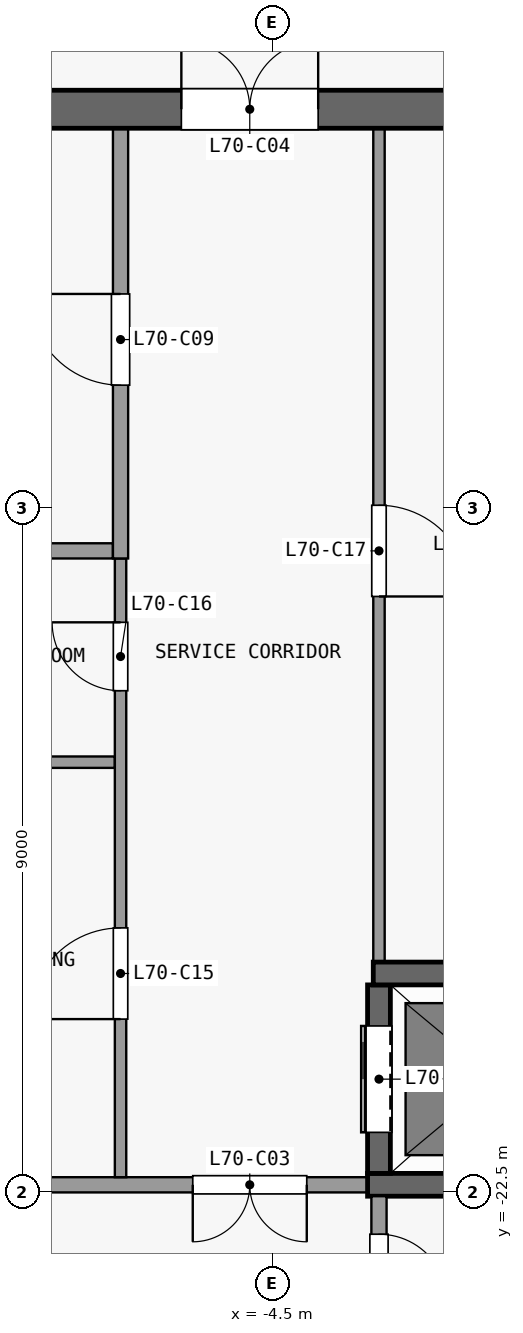
"""IFC4 building model, lengths in metres.
Left out: names, types, materials, properties, quantities, classifications, styles, units other than length and angle.
Written with IfcOpenShell. Run it as: python <this file> out.ifc"""

import sys

from ifc_helpers import new_model, si_unit, direction, frame, frame_2d, origin, place, context, subcontext, project, spatial, rectangle, extrude, element, fill, save


model = new_model("IFC4")
c1 = context("Model", 3, precision=1e-05, world=origin(), true_north=direction((0.0, 1.0)))
c2 = subcontext(c1, "Body", "Model", "MODEL_VIEW")
j1 = project(units=[si_unit("LENGTHUNIT", "METRE"), si_unit("PLANEANGLEUNIT", "RADIAN")], contexts=[c1])
p1 = place(None, origin())
s1 = spatial("IfcSite", under=j1, at=p1, CompositionType="ELEMENT")
p2 = place(p1, origin())
s2 = spatial("IfcBuilding", under=s1, at=p2, CompositionType="ELEMENT")
p3 = place(p2, frame((0.0, 0.0, 277.1)))
s3 = spatial("IfcBuildingStorey", under=s2, at=p3, CompositionType="ELEMENT", Elevation=277.1)
p4 = place(p3, frame((-13.1, -8.25, 0.0), z_axis=(0.0, 0.0, 1.0), x_axis=(1.0, 0.0, 0.0)))
e1 = element("IfcWall", 1, at=p4, inside=s3, PredefinedType="SHEAR", context=c2, shape_type="SweptSolid", body=[
    extrude(rectangle(XDim=26.2, YDim=0.5, at=frame_2d((13.1, 0.0))), origin(), (0.0, 0.0, 1.0), 3.3),
])
p5 = place(p4, frame((7.4, 0.0, 0.0)))
e2 = element("IfcOpeningElement", 2, at=p5, cuts=e1, PredefinedType="OPENING", context=c2, shape_type="SweptSolid", body=[
    extrude(rectangle(XDim=1.8, YDim=2.1, at=frame_2d((0.9, 1.05))), frame((0.0, 0.26, 0.0), z_axis=(0.0, -1.0, 0.0), x_axis=(1.0, 0.0, 0.0)), (0.0, 0.0, 1.0), 0.52),
])
p6 = place(p4, frame((17.0, 0.0, 0.0)))
e3 = element("IfcOpeningElement", 3, at=p6, cuts=e1, PredefinedType="OPENING", context=c2, shape_type="SweptSolid", body=[
    extrude(rectangle(XDim=1.8, YDim=2.1, at=frame_2d((0.9, 1.05))), frame((0.0, 0.26, 0.0), z_axis=(0.0, -1.0, 0.0), x_axis=(1.0, 0.0, 0.0)), (0.0, 0.0, 1.0), 0.52),
])
p7 = place(p4, frame((2.325, 0.0, 0.0)))
e4 = element("IfcOpeningElement", 4, at=p7, cuts=e1, PredefinedType="OPENING", context=c2, shape_type="SweptSolid", body=[
    extrude(rectangle(XDim=0.9, YDim=2.1, at=frame_2d((0.45, 1.05))), frame((0.0, 0.26, 0.0), z_axis=(0.0, -1.0, 0.0), x_axis=(1.0, 0.0, 0.0)), (0.0, 0.0, 1.0), 0.52),
])
p8 = place(p4, frame((22.975, 0.0, 0.0)))
e5 = element("IfcOpeningElement", 5, at=p8, cuts=e1, PredefinedType="OPENING", context=c2, shape_type="SweptSolid", body=[
    extrude(rectangle(XDim=0.9, YDim=2.1, at=frame_2d((0.45, 1.05))), frame((0.0, 0.26, 0.0), z_axis=(0.0, -1.0, 0.0), x_axis=(1.0, 0.0, 0.0)), (0.0, 0.0, 1.0), 0.52),
])
p9 = place(p3, frame((-3.25, -22.4, 0.0), z_axis=(0.0, 0.0, 1.0), x_axis=(-1.0, 0.0, 0.0)))
e6 = element("IfcWall", 6, at=p9, inside=s3, PredefinedType="PARTITIONING", context=c2, shape_type="SweptSolid", body=[
    extrude(rectangle(XDim=6.2, YDim=0.2, at=frame_2d((3.1, 0.0))), origin(), (0.0, 0.0, 1.0), 3.3),
])
p10 = place(p9, frame((0.8, 0.0, 0.0)))
e7 = element("IfcOpeningElement", 7, at=p10, cuts=e6, PredefinedType="OPENING", context=c2, shape_type="SweptSolid", body=[
    extrude(rectangle(XDim=1.5, YDim=2.1, at=frame_2d((0.75, 1.05))), frame((0.0, 0.11, 0.0), z_axis=(0.0, -1.0, 0.0), x_axis=(1.0, 0.0, 0.0)), (0.0, 0.0, 1.0), 0.22),
])
p11 = place(p3, frame((-3.25, -22.4, 0.0), z_axis=(0.0, 0.0, 1.0), x_axis=(1.0, 0.0, 0.0)))
e8 = element("IfcWall", 8, at=p11, inside=s3, PredefinedType="SHEAR", context=c2, shape_type="SweptSolid", body=[
    extrude(rectangle(XDim=6.5, YDim=0.3, at=frame_2d((3.25, 0.0))), origin(), (0.0, 0.0, 1.0), 3.3),
])
p12 = place(p3, frame((-3.175, -19.62, 0.0), z_axis=(0.0, 0.0, 1.0), x_axis=(1.0, 0.0, 0.0)))
e9 = element("IfcWall", 9, at=p12, inside=s3, PredefinedType="SHEAR", context=c2, shape_type="SweptSolid", body=[
    extrude(rectangle(XDim=3.025, YDim=0.3, at=frame_2d((1.513, 0.0))), origin(), (0.0, 0.0, 1.0), 3.3),
])
p13 = place(p3, frame((-9.5, -16.84, 0.0), z_axis=(0.0, 0.0, 1.0), x_axis=(1.0, 0.0, 0.0)))
e10 = element("IfcWall", 10, at=p13, inside=s3, PredefinedType="PARTITIONING", context=c2, shape_type="SweptSolid", body=[
    extrude(rectangle(XDim=2.925, YDim=0.15, at=frame_2d((1.462, 0.0))), origin(), (0.0, 0.0, 1.0), 3.3),
])
p14 = place(p3, frame((-9.5, -14.06, 0.0), z_axis=(0.0, 0.0, 1.0), x_axis=(1.0, 0.0, 0.0)))
e11 = element("IfcWall", 11, at=p14, inside=s3, PredefinedType="PARTITIONING", context=c2, shape_type="SweptSolid", body=[
    extrude(rectangle(XDim=2.9, YDim=0.2, at=frame_2d((1.45, 0.0))), origin(), (0.0, 0.0, 1.0), 3.3),
])
p15 = place(p3, frame((-6.5, -22.3, 0.0), z_axis=(0.0, 0.0, 1.0), x_axis=(0.0, 1.0, 0.0)))
e12 = element("IfcWall", 12, at=p15, inside=s3, PredefinedType="PARTITIONING", context=c2, shape_type="SweptSolid", body=[
    extrude(rectangle(XDim=8.14, YDim=0.15, at=frame_2d((4.07, 0.0))), origin(), (0.0, 0.0, 1.0), 3.3),
])
p16 = place(p15, frame((2.08, 0.0, 0.0)))
e13 = element("IfcOpeningElement", 13, at=p16, cuts=e12, PredefinedType="OPENING", context=c2, shape_type="SweptSolid", body=[
    extrude(rectangle(XDim=1.2, YDim=2.1, at=frame_2d((0.6, 1.05))), frame((0.0, 0.085, 0.0), z_axis=(0.0, -1.0, 0.0), x_axis=(1.0, 0.0, 0.0)), (0.0, 0.0, 1.0), 0.17),
])
p17 = place(p15, frame((6.4, 0.0, 0.0)))
e14 = element("IfcOpeningElement", 14, at=p17, cuts=e12, PredefinedType="OPENING", context=c2, shape_type="SweptSolid", body=[
    extrude(rectangle(XDim=0.9, YDim=2.1, at=frame_2d((0.45, 1.05))), frame((0.0, 0.085, 0.0), z_axis=(0.0, -1.0, 0.0), x_axis=(1.0, 0.0, 0.0)), (0.0, 0.0, 1.0), 0.17),
])
p18 = place(p3, frame((-6.5, -14.16, 0.0), z_axis=(0.0, 0.0, 1.0), x_axis=(0.0, 1.0, 0.0)))
e15 = element("IfcWall", 15, at=p18, inside=s3, PredefinedType="PARTITIONING", context=c2, shape_type="SweptSolid", body=[
    extrude(rectangle(XDim=5.66, YDim=0.2, at=frame_2d((2.83, 0.0))), origin(), (0.0, 0.0, 1.0), 3.3),
])
p19 = place(p18, frame((2.28, 0.0, 0.0)))
e16 = element("IfcOpeningElement", 16, at=p19, cuts=e15, PredefinedType="OPENING", context=c2, shape_type="SweptSolid", body=[
    extrude(rectangle(XDim=1.2, YDim=2.1, at=frame_2d((0.6, 1.05))), frame((0.0, 0.11, 0.0), z_axis=(0.0, -1.0, 0.0), x_axis=(1.0, 0.0, 0.0)), (0.0, 0.0, 1.0), 0.22),
])
p20 = place(p3, frame((-3.1, -22.55, 0.0), z_axis=(0.0, 0.0, 1.0), x_axis=(0.0, -1.0, 0.0)))
e17 = element("IfcWall", 17, at=p20, inside=s3, PredefinedType="PARTITIONING", context=c2, shape_type="SweptSolid", body=[
    extrude(rectangle(XDim=2.05, YDim=0.2, at=frame_2d((1.025, 0.0))), origin(), (0.0, 0.0, 1.0), 3.3),
])
p21 = place(p20, frame((0.5, 0.0, 0.0)))
e18 = element("IfcOpeningElement", 18, at=p21, cuts=e17, PredefinedType="OPENING", context=c2, shape_type="SweptSolid", body=[
    extrude(rectangle(XDim=0.9, YDim=2.1, at=frame_2d((0.45, 1.05))), frame((0.0, 0.11, 0.0), z_axis=(0.0, -1.0, 0.0), x_axis=(1.0, 0.0, 0.0)), (0.0, 0.0, 1.0), 0.22),
])
p22 = place(p3, frame((-3.1, -22.25, 0.0), z_axis=(0.0, 0.0, 1.0), x_axis=(0.0, 1.0, 0.0)))
e19 = element("IfcWall", 19, at=p22, inside=s3, PredefinedType="SHEAR", context=c2, shape_type="SweptSolid", body=[
    extrude(rectangle(XDim=2.48, YDim=0.3, at=frame_2d((1.24, 0.0))), origin(), (0.0, 0.0, 1.0), 3.3),
])
p23 = place(p22, frame((0.54, 0.0, 0.0)))
e20 = element("IfcOpeningElement", 20, at=p23, cuts=e19, PredefinedType="OPENING", context=c2, shape_type="SweptSolid", body=[
    extrude(rectangle(XDim=1.4, YDim=2.1, at=frame_2d((0.7, 1.05))), frame((0.0, 0.16, 0.0), z_axis=(0.0, -1.0, 0.0), x_axis=(1.0, 0.0, 0.0)), (0.0, 0.0, 1.0), 0.32),
])
p24 = place(p3, frame((-3.1, -8.5, 0.0), z_axis=(0.0, 0.0, 1.0), x_axis=(0.0, -1.0, 0.0)))
e21 = element("IfcWall", 21, at=p24, inside=s3, PredefinedType="PARTITIONING", context=c2, shape_type="SweptSolid", body=[
    extrude(rectangle(XDim=10.97, YDim=0.15, at=frame_2d((5.485, 0.0))), origin(), (0.0, 0.0, 1.0), 3.3),
])
p25 = place(p24, frame((4.96, 0.0, 0.0)))
e22 = element("IfcOpeningElement", 22, at=p25, cuts=e21, PredefinedType="OPENING", context=c2, shape_type="SweptSolid", body=[
    extrude(rectangle(XDim=1.2, YDim=2.1, at=frame_2d((0.6, 1.05))), frame((0.0, 0.085, 0.0), z_axis=(0.0, -1.0, 0.0), x_axis=(1.0, 0.0, 0.0)), (0.0, 0.0, 1.0), 0.17),
])
p26 = place(p23, origin())
e23 = element("IfcDoor", 23, at=p26, inside=s3, OperationType="DOUBLE_DOOR_SLIDING", PredefinedType="DOOR", context=c2, shape_type="SweptSolid", body=[
    extrude(rectangle(XDim=1.4, YDim=2.1, at=frame_2d((0.7, 1.05))), frame((0.0, 0.025, 0.0), z_axis=(0.0, -1.0, 0.0), x_axis=(1.0, 0.0, 0.0)), (0.0, 0.0, 1.0), 0.05),
])
fill(e20, e23)
p27 = place(p10, origin())
e24 = element("IfcDoor", 24, at=p27, inside=s3, OperationType="DOUBLE_DOOR_SINGLE_SWING", PredefinedType="DOOR", context=c2, shape_type="SweptSolid", body=[
    extrude(rectangle(XDim=1.5, YDim=2.1, at=frame_2d((0.75, 1.05))), frame((0.0, 0.025, 0.0), z_axis=(0.0, -1.0, 0.0), x_axis=(1.0, 0.0, 0.0)), (0.0, 0.0, 1.0), 0.05),
])
fill(e7, e24)
p28 = place(p5, origin())
e25 = element("IfcDoor", 25, at=p28, inside=s3, OperationType="DOUBLE_DOOR_SINGLE_SWING", PredefinedType="DOOR", context=c2, shape_type="SweptSolid", body=[
    extrude(rectangle(XDim=1.8, YDim=2.1, at=frame_2d((0.9, 1.05))), frame((0.0, 0.025, 0.0), z_axis=(0.0, -1.0, 0.0), x_axis=(1.0, 0.0, 0.0)), (0.0, 0.0, 1.0), 0.05),
])
fill(e2, e25)
p29 = place(p19, origin())
e26 = element("IfcDoor", 26, at=p29, inside=s3, OperationType="SINGLE_SWING_RIGHT", PredefinedType="DOOR", context=c2, shape_type="SweptSolid", body=[
    extrude(rectangle(XDim=1.2, YDim=2.1, at=frame_2d((0.6, 1.05))), frame((0.0, 0.025, 0.0), z_axis=(0.0, -1.0, 0.0), x_axis=(1.0, 0.0, 0.0)), (0.0, 0.0, 1.0), 0.05),
])
fill(e16, e26)
p30 = place(p21, origin())
e27 = element("IfcDoor", 27, at=p30, inside=s3, OperationType="SINGLE_SWING_RIGHT", PredefinedType="DOOR", context=c2, shape_type="SweptSolid", body=[
    extrude(rectangle(XDim=0.9, YDim=2.1, at=frame_2d((0.45, 1.05))), frame((0.0, 0.025, 0.0), z_axis=(0.0, -1.0, 0.0), x_axis=(1.0, 0.0, 0.0)), (0.0, 0.0, 1.0), 0.05),
])
fill(e18, e27)
p31 = place(p16, origin())
e28 = element("IfcDoor", 28, at=p31, inside=s3, OperationType="SINGLE_SWING_LEFT", PredefinedType="DOOR", context=c2, shape_type="SweptSolid", body=[
    extrude(rectangle(XDim=1.2, YDim=2.1, at=frame_2d((0.6, 1.05))), frame((0.0, 0.025, 0.0), z_axis=(0.0, -1.0, 0.0), x_axis=(1.0, 0.0, 0.0)), (0.0, 0.0, 1.0), 0.05),
])
fill(e13, e28)
p32 = place(p17, origin())
e29 = element("IfcDoor", 29, at=p32, inside=s3, OperationType="SINGLE_SWING_RIGHT", PredefinedType="DOOR", context=c2, shape_type="SweptSolid", body=[
    extrude(rectangle(XDim=0.9, YDim=2.1, at=frame_2d((0.45, 1.05))), frame((0.0, 0.025, 0.0), z_axis=(0.0, -1.0, 0.0), x_axis=(1.0, 0.0, 0.0)), (0.0, 0.0, 1.0), 0.05),
])
fill(e14, e29)
p33 = place(p25, origin())
e30 = element("IfcDoor", 30, at=p33, inside=s3, OperationType="SINGLE_SWING_RIGHT", PredefinedType="DOOR", context=c2, shape_type="SweptSolid", body=[
    extrude(rectangle(XDim=1.2, YDim=2.1, at=frame_2d((0.6, 1.05))), frame((0.0, 0.025, 0.0), z_axis=(0.0, -1.0, 0.0), x_axis=(1.0, 0.0, 0.0)), (0.0, 0.0, 1.0), 0.05),
])
fill(e22, e30)
save(model, sys.argv[1])
